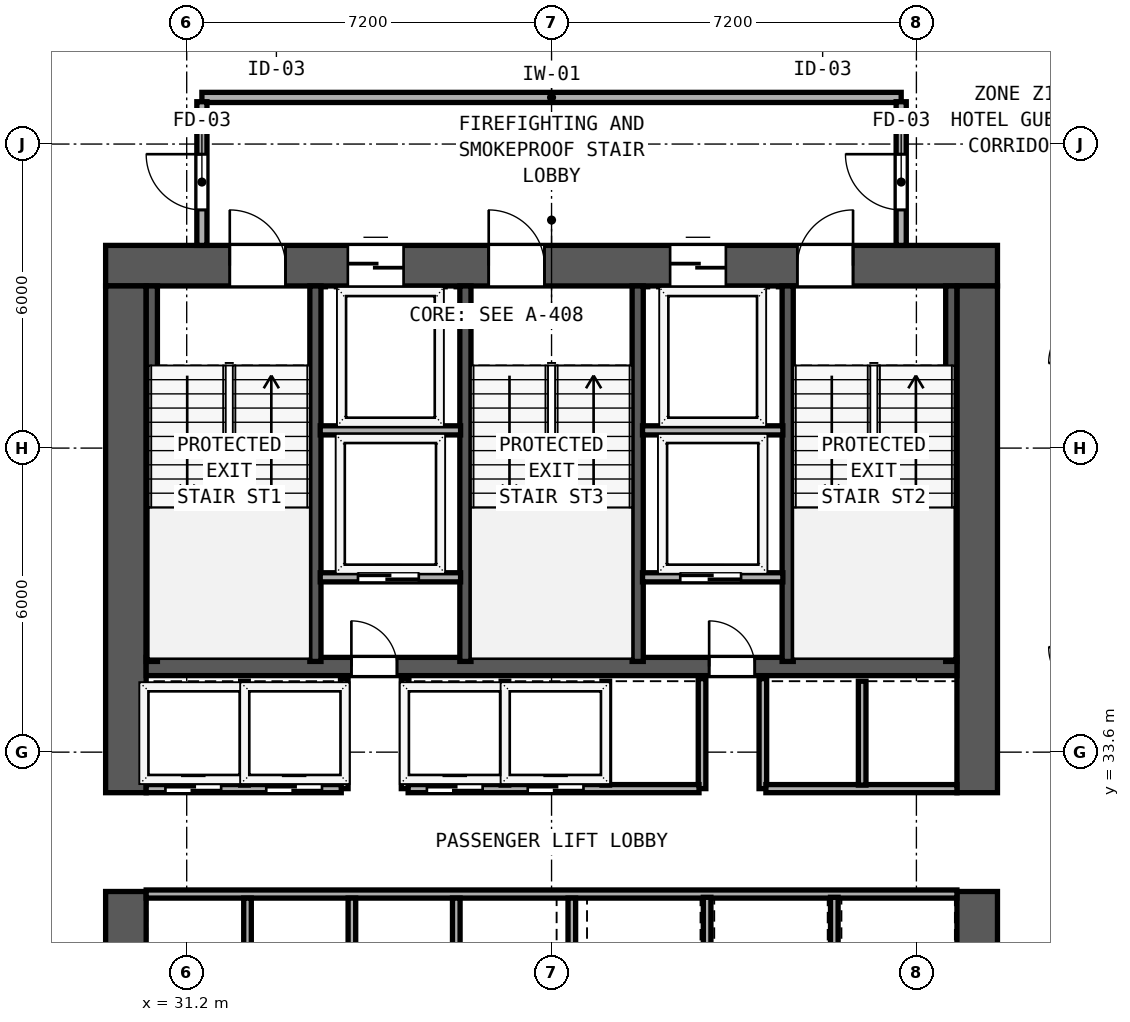
"""IFC4 building model, lengths in metres.
Left out: names, types, materials, properties, quantities, classifications, styles, units other than length and angle.
Written with IfcOpenShell. Run it as: python <this file> out.ifc"""

import sys

from ifc_helpers import new_model, si_unit, direction, frame, frame_2d, origin, place, context, subcontext, project, spatial, rectangle, extrude, element, fill, save


model = new_model("IFC4")
c1 = context("Model", 3, precision=1e-05, world=origin(), true_north=direction((0.0, 1.0)))
c2 = subcontext(c1, "Body", "Model", "MODEL_VIEW")
j1 = project(units=[si_unit("LENGTHUNIT", "METRE"), si_unit("PLANEANGLEUNIT", "RADIAN")], contexts=[c1])
p1 = place(None, origin())
s1 = spatial("IfcSite", under=j1, at=p1, CompositionType="ELEMENT")
p2 = place(p1, origin())
s2 = spatial("IfcBuilding", under=s1, at=p2, CompositionType="ELEMENT")
p3 = place(p2, frame((0.0, 0.0, 35.4)))
s3 = spatial("IfcBuildingStorey", under=s2, at=p3, CompositionType="ELEMENT", Elevation=35.4)
p4 = place(p3, frame((29.6, 43.2, 0.0), z_axis=(0.0, 0.0, 1.0), x_axis=(1.0, 0.0, 0.0)))
e1 = element("IfcWall", 1, at=p4, inside=s3, PredefinedType="SHEAR", context=c2, shape_type="SweptSolid", body=[
    extrude(rectangle(XDim=17.6, YDim=0.8, at=frame_2d((8.8, 0.0))), origin(), (0.0, 0.0, 1.0), 3.6),
])
p5 = place(p4, frame((2.45, 0.0, 0.0)))
e2 = element("IfcOpeningElement", 2, at=p5, cuts=e1, PredefinedType="OPENING", context=c2, shape_type="SweptSolid", body=[
    extrude(rectangle(XDim=1.1, YDim=2.15, at=frame_2d((0.55, 1.075))), frame((0.0, 0.41, 0.0), z_axis=(0.0, -1.0, 0.0), x_axis=(1.0, 0.0, 0.0)), (0.0, 0.0, 1.0), 0.82),
])
p6 = place(p4, frame((7.56, 0.0, 0.0)))
e3 = element("IfcOpeningElement", 3, at=p6, cuts=e1, PredefinedType="OPENING", context=c2, shape_type="SweptSolid", body=[
    extrude(rectangle(XDim=1.1, YDim=2.15, at=frame_2d((0.55, 1.075))), frame((0.0, 0.41, 0.0), z_axis=(0.0, -1.0, 0.0), x_axis=(1.0, 0.0, 0.0)), (0.0, 0.0, 1.0), 0.82),
])
p7 = place(p4, frame((13.65, 0.0, 0.0)))
e4 = element("IfcOpeningElement", 4, at=p7, cuts=e1, PredefinedType="OPENING", context=c2, shape_type="SweptSolid", body=[
    extrude(rectangle(XDim=1.1, YDim=2.15, at=frame_2d((0.55, 1.075))), frame((0.0, 0.41, 0.0), z_axis=(0.0, -1.0, 0.0), x_axis=(1.0, 0.0, 0.0)), (0.0, 0.0, 1.0), 0.82),
])
p8 = place(p4, frame((4.78, 0.0, 0.0)))
e5 = element("IfcOpeningElement", 5, at=p8, cuts=e1, PredefinedType="OPENING", context=c2, shape_type="SweptSolid", body=[
    extrude(rectangle(XDim=1.1, YDim=2.2, at=frame_2d((0.55, 1.1))), frame((0.0, 0.41, 0.0), z_axis=(0.0, -1.0, 0.0), x_axis=(1.0, 0.0, 0.0)), (0.0, 0.0, 1.0), 0.82),
])
p9 = place(p4, frame((11.14, 0.0, 0.0)))
e6 = element("IfcOpeningElement", 6, at=p9, cuts=e1, PredefinedType="OPENING", context=c2, shape_type="SweptSolid", body=[
    extrude(rectangle(XDim=1.1, YDim=2.2, at=frame_2d((0.55, 1.1))), frame((0.0, 0.41, 0.0), z_axis=(0.0, -1.0, 0.0), x_axis=(1.0, 0.0, 0.0)), (0.0, 0.0, 1.0), 0.82),
])
p10 = place(p3, frame((30.0, 26.8, 0.0), z_axis=(0.0, 0.0, 1.0), x_axis=(0.0, 1.0, 0.0)))
e7 = element("IfcWall", 7, at=p10, inside=s3, PredefinedType="SHEAR", context=c2, shape_type="SweptSolid", body=[
    extrude(rectangle(XDim=4.05, YDim=0.8, at=frame_2d((2.025, 0.0))), origin(), (0.0, 0.0, 1.0), 3.6),
])
p11 = place(p3, frame((30.0, 32.8, 0.0), z_axis=(0.0, 0.0, 1.0), x_axis=(0.0, 1.0, 0.0)))
e8 = element("IfcWall", 8, at=p11, inside=s3, PredefinedType="SHEAR", context=c2, shape_type="SweptSolid", body=[
    extrude(rectangle(XDim=10.0, YDim=0.8, at=frame_2d((5.0, 0.0))), origin(), (0.0, 0.0, 1.0), 3.6),
])
p12 = place(p3, frame((46.8, 26.8, 0.0), z_axis=(0.0, 0.0, 1.0), x_axis=(0.0, 1.0, 0.0)))
e9 = element("IfcWall", 9, at=p12, inside=s3, PredefinedType="SHEAR", context=c2, shape_type="SweptSolid", body=[
    extrude(rectangle(XDim=4.05, YDim=0.8, at=frame_2d((2.025, 0.0))), origin(), (0.0, 0.0, 1.0), 3.6),
])
p13 = place(p3, frame((46.8, 32.8, 0.0), z_axis=(0.0, 0.0, 1.0), x_axis=(0.0, 1.0, 0.0)))
e10 = element("IfcWall", 10, at=p13, inside=s3, PredefinedType="SHEAR", context=c2, shape_type="SweptSolid", body=[
    extrude(rectangle(XDim=10.0, YDim=0.8, at=frame_2d((5.0, 0.0))), origin(), (0.0, 0.0, 1.0), 3.6),
])
p14 = place(p3, frame((30.4, 35.29, 0.0), z_axis=(0.0, 0.0, 1.0), x_axis=(1.0, 0.0, 0.0)))
e11 = element("IfcWall", 11, at=p14, inside=s3, PredefinedType="SHEAR", context=c2, shape_type="SweptSolid", body=[
    extrude(rectangle(XDim=16.0, YDim=0.36, at=frame_2d((8.0, 0.0))), origin(), (0.0, 0.0, 1.0), 3.6),
])
p15 = place(p14, frame((4.95, 0.0, 0.0), z_axis=(0.0, 0.0, 1.0), x_axis=(-1.0, 0.0, 0.0)))
e12 = element("IfcOpeningElement", 12, at=p15, cuts=e11, PredefinedType="OPENING", context=c2, shape_type="SweptSolid", body=[
    extrude(rectangle(XDim=0.9, YDim=2.1, at=frame_2d((0.45, 1.05))), frame((0.0, 0.19, 0.0), z_axis=(0.0, -1.0, 0.0), x_axis=(1.0, 0.0, 0.0)), (0.0, 0.0, 1.0), 0.38),
])
p16 = place(p14, frame((12.01, 0.0, 0.0), z_axis=(0.0, 0.0, 1.0), x_axis=(-1.0, 0.0, 0.0)))
e13 = element("IfcOpeningElement", 13, at=p16, cuts=e11, PredefinedType="OPENING", context=c2, shape_type="SweptSolid", body=[
    extrude(rectangle(XDim=0.9, YDim=2.1, at=frame_2d((0.45, 1.05))), frame((0.0, 0.19, 0.0), z_axis=(0.0, -1.0, 0.0), x_axis=(1.0, 0.0, 0.0)), (0.0, 0.0, 1.0), 0.38),
])
for number, where, z_axis, x_axis in (
    (14, (30.512, 35.39, 0.0), (0.0, 0.0, 1.0), (0.0, 1.0, 0.0)),
    (15, (33.74, 35.39, 0.0), (0.0, 0.0, 1.0), (0.0, 1.0, 0.0)),
    (16, (36.7, 35.39, 0.0), (0.0, 0.0, 1.0), (0.0, 1.0, 0.0)),
    (17, (40.1, 35.39, 0.0), (0.0, 0.0, 1.0), (0.0, 1.0, 0.0)),
    (18, (43.06, 35.39, 0.0), (0.0, 0.0, 1.0), (0.0, 1.0, 0.0)),
    (19, (46.288, 35.39, 0.0), (0.0, 0.0, 1.0), (0.0, 1.0, 0.0)),
):
    element("IfcWall", number, at=place(p3, frame(where, z_axis=z_axis, x_axis=x_axis)), inside=s3, PredefinedType="SHEAR", context=c2, shape_type="SweptSolid", body=[
        extrude(rectangle(XDim=7.41, YDim=0.22, at=frame_2d((3.705, 0.0))), origin(), (0.0, 0.0, 1.0), 3.6),
    ])
p17 = place(p3, frame((31.5, 46.52, 0.0), z_axis=(0.0, 0.0, 1.0), x_axis=(1.0, 0.0, 0.0)))
e20 = element("IfcWall", 20, at=p17, inside=s3, PredefinedType="SOLIDWALL", context=c2, shape_type="SweptSolid", body=[
    extrude(rectangle(XDim=13.8, YDim=0.2, at=frame_2d((6.9, 0.0))), origin(), (0.0, 0.0, 1.0), 3.6),
])
p18 = place(p3, frame((31.5, 43.6, 0.0), z_axis=(0.0, 0.0, 1.0), x_axis=(0.0, 1.0, 0.0)))
e21 = element("IfcWall", 21, at=p18, inside=s3, PredefinedType="SOLIDWALL", context=c2, shape_type="SweptSolid", body=[
    extrude(rectangle(XDim=2.835, YDim=0.2, at=frame_2d((1.417, 0.0))), origin(), (0.0, 0.0, 1.0), 3.6),
])
p19 = place(p18, frame((1.8, 0.0, 0.0), z_axis=(0.0, 0.0, 1.0), x_axis=(-1.0, 0.0, 0.0)))
e22 = element("IfcOpeningElement", 22, at=p19, cuts=e21, PredefinedType="OPENING", context=c2, shape_type="SweptSolid", body=[
    extrude(rectangle(XDim=1.1, YDim=2.15, at=frame_2d((0.55, 1.075))), frame((0.0, 0.11, 0.0), z_axis=(0.0, -1.0, 0.0), x_axis=(1.0, 0.0, 0.0)), (0.0, 0.0, 1.0), 0.22),
])
p20 = place(p3, frame((45.3, 43.6, 0.0), z_axis=(0.0, 0.0, 1.0), x_axis=(0.0, 1.0, 0.0)))
e23 = element("IfcWall", 23, at=p20, inside=s3, PredefinedType="SOLIDWALL", context=c2, shape_type="SweptSolid", body=[
    extrude(rectangle(XDim=2.835, YDim=0.2, at=frame_2d((1.417, 0.0))), origin(), (0.0, 0.0, 1.0), 3.6),
])
p21 = place(p20, frame((0.7, 0.0, 0.0)))
e24 = element("IfcOpeningElement", 24, at=p21, cuts=e23, PredefinedType="OPENING", context=c2, shape_type="SweptSolid", body=[
    extrude(rectangle(XDim=1.1, YDim=2.15, at=frame_2d((0.55, 1.075))), frame((0.0, 0.11, 0.0), z_axis=(0.0, -1.0, 0.0), x_axis=(1.0, 0.0, 0.0)), (0.0, 0.0, 1.0), 0.22),
])
for number, where, z_axis, x_axis in (
    (25, (33.835, 39.95, 0.0), (0.0, 0.0, 1.0), (1.0, 0.0, 0.0)),
    (26, (40.195, 39.95, 0.0), (0.0, 0.0, 1.0), (1.0, 0.0, 0.0)),
):
    element("IfcWall", number, at=place(p3, frame(where, z_axis=z_axis, x_axis=x_axis)), inside=s3, PredefinedType="SOLIDWALL", context=c2, shape_type="SweptSolid", body=[
        extrude(rectangle(XDim=2.77, YDim=0.18, at=frame_2d((1.385, 0.0))), origin(), (0.0, 0.0, 1.0), 3.6),
    ])
p22 = place(p3, frame((33.835, 37.05, 0.0), z_axis=(0.0, 0.0, 1.0), x_axis=(1.0, 0.0, 0.0)))
e27 = element("IfcWall", 27, at=p22, inside=s3, PredefinedType="SOLIDWALL", context=c2, shape_type="SweptSolid", body=[
    extrude(rectangle(XDim=2.77, YDim=0.18, at=frame_2d((1.385, 0.0))), origin(), (0.0, 0.0, 1.0), 3.6),
])
p23 = place(p22, frame((1.945, 0.0, 0.0), z_axis=(0.0, 0.0, 1.0), x_axis=(-1.0, 0.0, 0.0)))
e28 = element("IfcOpeningElement", 28, at=p23, cuts=e27, PredefinedType="OPENING", context=c2, shape_type="SweptSolid", body=[
    extrude(rectangle(XDim=1.2, YDim=2.2, at=frame_2d((0.6, 1.1))), frame((0.0, 0.1, 0.0), z_axis=(0.0, -1.0, 0.0), x_axis=(1.0, 0.0, 0.0)), (0.0, 0.0, 1.0), 0.2),
])
for number, where, z_axis, x_axis in (
    (29, (34.31, 32.88, 0.0), (0.0, 0.0, 1.0), (0.0, 1.0, 0.0)),
    (30, (35.51, 32.88, 0.0), (0.0, 0.0, 1.0), (0.0, 1.0, 0.0)),
):
    element("IfcWall", number, at=place(p3, frame(where, z_axis=z_axis, x_axis=x_axis)), inside=s3, PredefinedType="SOLIDWALL", context=c2, shape_type="SweptSolid", body=[
        extrude(rectangle(XDim=2.17, YDim=0.15, at=frame_2d((1.085, 0.0))), origin(), (0.0, 0.0, 1.0), 3.6),
    ])
p24 = place(p3, frame((40.195, 37.05, 0.0), z_axis=(0.0, 0.0, 1.0), x_axis=(1.0, 0.0, 0.0)))
e31 = element("IfcWall", 31, at=p24, inside=s3, PredefinedType="SOLIDWALL", context=c2, shape_type="SweptSolid", body=[
    extrude(rectangle(XDim=2.77, YDim=0.18, at=frame_2d((1.385, 0.0))), origin(), (0.0, 0.0, 1.0), 3.6),
])
p25 = place(p24, frame((1.945, 0.0, 0.0), z_axis=(0.0, 0.0, 1.0), x_axis=(-1.0, 0.0, 0.0)))
e32 = element("IfcOpeningElement", 32, at=p25, cuts=e31, PredefinedType="OPENING", context=c2, shape_type="SweptSolid", body=[
    extrude(rectangle(XDim=1.2, YDim=2.2, at=frame_2d((0.6, 1.1))), frame((0.0, 0.1, 0.0), z_axis=(0.0, -1.0, 0.0), x_axis=(1.0, 0.0, 0.0)), (0.0, 0.0, 1.0), 0.2),
])
for number, where, z_axis, x_axis in (
    (33, (41.37, 32.88, 0.0), (0.0, 0.0, 1.0), (0.0, 1.0, 0.0)),
    (34, (42.57, 32.88, 0.0), (0.0, 0.0, 1.0), (0.0, 1.0, 0.0)),
):
    element("IfcWall", number, at=place(p3, frame(where, z_axis=z_axis, x_axis=x_axis)), inside=s3, PredefinedType="SOLIDWALL", context=c2, shape_type="SweptSolid", body=[
        extrude(rectangle(XDim=2.17, YDim=0.15, at=frame_2d((1.085, 0.0))), origin(), (0.0, 0.0, 1.0), 3.6),
    ])
p26 = place(p3, frame((30.4, 32.88, 0.0), z_axis=(0.0, 0.0, 1.0), x_axis=(1.0, 0.0, 0.0)))
e35 = element("IfcWall", 35, at=p26, inside=s3, PredefinedType="SOLIDWALL", context=c2, shape_type="SweptSolid", body=[
    extrude(rectangle(XDim=3.85, YDim=0.16, at=frame_2d((1.925, 0.0))), origin(), (0.0, 0.0, 1.0), 3.6),
])
p27 = place(p26, frame((1.48, 0.0, 0.0), z_axis=(0.0, 0.0, 1.0), x_axis=(-1.0, 0.0, 0.0)))
e36 = element("IfcOpeningElement", 36, at=p27, cuts=e35, PredefinedType="OPENING", context=c2, shape_type="SweptSolid", body=[
    extrude(rectangle(XDim=1.1, YDim=2.2, at=frame_2d((0.55, 1.1))), frame((0.0, 0.09, 0.0), z_axis=(0.0, -1.0, 0.0), x_axis=(1.0, 0.0, 0.0)), (0.0, 0.0, 1.0), 0.18),
])
p28 = place(p26, frame((3.47, 0.0, 0.0), z_axis=(0.0, 0.0, 1.0), x_axis=(-1.0, 0.0, 0.0)))
e37 = element("IfcOpeningElement", 37, at=p28, cuts=e35, PredefinedType="OPENING", context=c2, shape_type="SweptSolid", body=[
    extrude(rectangle(XDim=1.1, YDim=2.2, at=frame_2d((0.55, 1.1))), frame((0.0, 0.09, 0.0), z_axis=(0.0, -1.0, 0.0), x_axis=(1.0, 0.0, 0.0)), (0.0, 0.0, 1.0), 0.18),
])
p29 = place(p3, frame((35.57, 32.88, 0.0), z_axis=(0.0, 0.0, 1.0), x_axis=(1.0, 0.0, 0.0)))
e38 = element("IfcWall", 38, at=p29, inside=s3, PredefinedType="SOLIDWALL", context=c2, shape_type="SweptSolid", body=[
    extrude(rectangle(XDim=5.74, YDim=0.16, at=frame_2d((2.87, 0.0))), origin(), (0.0, 0.0, 1.0), 3.6),
])
p30 = place(p29, frame((1.47, 0.0, 0.0), z_axis=(0.0, 0.0, 1.0), x_axis=(-1.0, 0.0, 0.0)))
e39 = element("IfcOpeningElement", 39, at=p30, cuts=e38, PredefinedType="OPENING", context=c2, shape_type="SweptSolid", body=[
    extrude(rectangle(XDim=1.1, YDim=2.2, at=frame_2d((0.55, 1.1))), frame((0.0, 0.09, 0.0), z_axis=(0.0, -1.0, 0.0), x_axis=(1.0, 0.0, 0.0)), (0.0, 0.0, 1.0), 0.18),
])
p31 = place(p29, frame((3.46, 0.0, 0.0), z_axis=(0.0, 0.0, 1.0), x_axis=(-1.0, 0.0, 0.0)))
e40 = element("IfcOpeningElement", 40, at=p31, cuts=e38, PredefinedType="OPENING", context=c2, shape_type="SweptSolid", body=[
    extrude(rectangle(XDim=1.1, YDim=2.2, at=frame_2d((0.55, 1.1))), frame((0.0, 0.09, 0.0), z_axis=(0.0, -1.0, 0.0), x_axis=(1.0, 0.0, 0.0)), (0.0, 0.0, 1.0), 0.18),
])
p32 = place(p3, frame((42.63, 32.88, 0.0), z_axis=(0.0, 0.0, 1.0), x_axis=(1.0, 0.0, 0.0)))
e41 = element("IfcWall", 41, at=p32, inside=s3, PredefinedType="SOLIDWALL", context=c2, shape_type="SweptSolid", body=[
    extrude(rectangle(XDim=3.77, YDim=0.16, at=frame_2d((1.885, 0.0))), origin(), (0.0, 0.0, 1.0), 3.6),
])
for number, where, z_axis, x_axis in (
    (42, (32.34, 32.95, 0.0), (0.0, 0.0, 1.0), (0.0, 1.0, 0.0)),
    (43, (37.48, 32.95, 0.0), (0.0, 0.0, 1.0), (0.0, 1.0, 0.0)),
    (44, (39.47, 32.95, 0.0), (0.0, 0.0, 1.0), (0.0, 1.0, 0.0)),
    (45, (44.53, 32.95, 0.0), (0.0, 0.0, 1.0), (0.0, 1.0, 0.0)),
):
    element("IfcWall", number, at=place(p3, frame(where, z_axis=z_axis, x_axis=x_axis)), inside=s3, PredefinedType="SOLIDWALL", context=c2, shape_type="SweptSolid", body=[
        extrude(rectangle(XDim=2.05, YDim=0.15, at=frame_2d((1.025, 0.0))), origin(), (0.0, 0.0, 1.0), 3.6),
    ])
p33 = place(p3, frame((30.4, 30.8, 0.0), z_axis=(0.0, 0.0, 1.0), x_axis=(1.0, 0.0, 0.0)))
e46 = element("IfcWall", 46, at=p33, inside=s3, PredefinedType="SOLIDWALL", context=c2, shape_type="SweptSolid", body=[
    extrude(rectangle(XDim=16.0, YDim=0.16, at=frame_2d((8.0, 0.0))), origin(), (0.0, 0.0, 1.0), 3.6),
])
for number, where, z_axis, x_axis in (
    (47, (32.4, 28.735, 0.0), (0.0, 0.0, 1.0), (0.0, 1.0, 0.0)),
    (48, (34.46, 28.735, 0.0), (0.0, 0.0, 1.0), (0.0, 1.0, 0.0)),
    (49, (36.52, 28.735, 0.0), (0.0, 0.0, 1.0), (0.0, 1.0, 0.0)),
    (50, (38.8, 28.735, 0.0), (0.0, 0.0, 1.0), (0.0, 1.0, 0.0)),
):
    element("IfcWall", number, at=place(p3, frame(where, z_axis=z_axis, x_axis=x_axis)), inside=s3, PredefinedType="SOLIDWALL", context=c2, shape_type="SweptSolid", body=[
        extrude(rectangle(XDim=1.985, YDim=0.15, at=frame_2d((0.992, 0.0))), origin(), (0.0, 0.0, 1.0), 3.6),
    ])
for number, where, z_axis, x_axis in (
    (51, (41.47, 28.75, 0.0), (0.0, 0.0, 1.0), (0.0, 1.0, 0.0)),
    (52, (43.98, 28.75, 0.0), (0.0, 0.0, 1.0), (0.0, 1.0, 0.0)),
):
    element("IfcWall", number, at=place(p3, frame(where, z_axis=z_axis, x_axis=x_axis)), inside=s3, PredefinedType="SOLIDWALL", context=c2, shape_type="SweptSolid", body=[
        extrude(rectangle(XDim=1.985, YDim=0.15, at=frame_2d((0.993, 0.0))), origin(), (0.0, 0.0, 1.0), 3.6),
    ])
p34 = place(p5, origin())
e53 = element("IfcDoor", 53, at=p34, inside=s3, OperationType="SINGLE_SWING_LEFT", PredefinedType="DOOR", context=c2, shape_type="SweptSolid", body=[
    extrude(rectangle(XDim=1.1, YDim=2.15, at=frame_2d((0.55, 1.075))), frame((0.0, 0.185, 0.0), z_axis=(0.0, -1.0, 0.0), x_axis=(1.0, 0.0, 0.0)), (0.0, 0.0, 1.0), 0.05),
])
fill(e2, e53)
p35 = place(p6, origin())
e54 = element("IfcDoor", 54, at=p35, inside=s3, OperationType="SINGLE_SWING_LEFT", PredefinedType="DOOR", context=c2, shape_type="SweptSolid", body=[
    extrude(rectangle(XDim=1.1, YDim=2.15, at=frame_2d((0.55, 1.075))), frame((0.0, 0.185, 0.0), z_axis=(0.0, -1.0, 0.0), x_axis=(1.0, 0.0, 0.0)), (0.0, 0.0, 1.0), 0.05),
])
fill(e3, e54)
p36 = place(p7, origin())
e55 = element("IfcDoor", 55, at=p36, inside=s3, OperationType="SINGLE_SWING_RIGHT", PredefinedType="DOOR", context=c2, shape_type="SweptSolid", body=[
    extrude(rectangle(XDim=1.1, YDim=2.15, at=frame_2d((0.55, 1.075))), frame((0.0, 0.185, 0.0), z_axis=(0.0, -1.0, 0.0), x_axis=(1.0, 0.0, 0.0)), (0.0, 0.0, 1.0), 0.05),
])
fill(e4, e55)
p37 = place(p19, origin())
e56 = element("IfcDoor", 56, at=p37, inside=s3, OperationType="SINGLE_SWING_LEFT", PredefinedType="DOOR", context=c2, shape_type="SweptSolid", body=[
    extrude(rectangle(XDim=1.1, YDim=2.15, at=frame_2d((0.55, 1.075))), frame((0.0, 0.025, 0.0), z_axis=(0.0, -1.0, 0.0), x_axis=(1.0, 0.0, 0.0)), (0.0, 0.0, 1.0), 0.05),
])
fill(e22, e56)
p38 = place(p21, origin())
e57 = element("IfcDoor", 57, at=p38, inside=s3, OperationType="SINGLE_SWING_RIGHT", PredefinedType="DOOR", context=c2, shape_type="SweptSolid", body=[
    extrude(rectangle(XDim=1.1, YDim=2.15, at=frame_2d((0.55, 1.075))), frame((0.0, 0.025, 0.0), z_axis=(0.0, -1.0, 0.0), x_axis=(1.0, 0.0, 0.0)), (0.0, 0.0, 1.0), 0.05),
])
fill(e24, e57)
p39 = place(p8, origin())
e58 = element("IfcDoor", 58, at=p39, inside=s3, OperationType="SLIDING_TO_LEFT", PredefinedType="DOOR", context=c2, shape_type="SweptSolid", body=[
    extrude(rectangle(XDim=1.1, YDim=2.2, at=frame_2d((0.55, 1.1))), frame((0.0, 0.185, 0.0), z_axis=(0.0, -1.0, 0.0), x_axis=(1.0, 0.0, 0.0)), (0.0, 0.0, 1.0), 0.05),
])
fill(e5, e58)
p40 = place(p9, origin())
e59 = element("IfcDoor", 59, at=p40, inside=s3, OperationType="SLIDING_TO_LEFT", PredefinedType="DOOR", context=c2, shape_type="SweptSolid", body=[
    extrude(rectangle(XDim=1.1, YDim=2.2, at=frame_2d((0.55, 1.1))), frame((0.0, 0.185, 0.0), z_axis=(0.0, -1.0, 0.0), x_axis=(1.0, 0.0, 0.0)), (0.0, 0.0, 1.0), 0.05),
])
fill(e6, e59)
p41 = place(p23, origin())
e60 = element("IfcDoor", 60, at=p41, inside=s3, OperationType="SLIDING_TO_RIGHT", PredefinedType="DOOR", context=c2, shape_type="SweptSolid", body=[
    extrude(rectangle(XDim=1.2, YDim=2.2, at=frame_2d((0.6, 1.1))), frame((0.0, 0.025, 0.0), z_axis=(0.0, -1.0, 0.0), x_axis=(1.0, 0.0, 0.0)), (0.0, 0.0, 1.0), 0.05),
])
fill(e28, e60)
p42 = place(p15, origin())
e61 = element("IfcDoor", 61, at=p42, inside=s3, OperationType="SINGLE_SWING_RIGHT", PredefinedType="DOOR", context=c2, shape_type="SweptSolid", body=[
    extrude(rectangle(XDim=0.9, YDim=2.1, at=frame_2d((0.45, 1.05))), frame((0.0, 0.025, 0.0), z_axis=(0.0, -1.0, 0.0), x_axis=(1.0, 0.0, 0.0)), (0.0, 0.0, 1.0), 0.05),
])
fill(e12, e61)
p43 = place(p25, origin())
e62 = element("IfcDoor", 62, at=p43, inside=s3, OperationType="SLIDING_TO_RIGHT", PredefinedType="DOOR", context=c2, shape_type="SweptSolid", body=[
    extrude(rectangle(XDim=1.2, YDim=2.2, at=frame_2d((0.6, 1.1))), frame((0.0, 0.025, 0.0), z_axis=(0.0, -1.0, 0.0), x_axis=(1.0, 0.0, 0.0)), (0.0, 0.0, 1.0), 0.05),
])
fill(e32, e62)
p44 = place(p16, origin())
e63 = element("IfcDoor", 63, at=p44, inside=s3, OperationType="SINGLE_SWING_RIGHT", PredefinedType="DOOR", context=c2, shape_type="SweptSolid", body=[
    extrude(rectangle(XDim=0.9, YDim=2.1, at=frame_2d((0.45, 1.05))), frame((0.0, 0.025, 0.0), z_axis=(0.0, -1.0, 0.0), x_axis=(1.0, 0.0, 0.0)), (0.0, 0.0, 1.0), 0.05),
])
fill(e13, e63)
p45 = place(p27, origin())
e64 = element("IfcDoor", 64, at=p45, inside=s3, OperationType="SLIDING_TO_LEFT", PredefinedType="DOOR", context=c2, shape_type="SweptSolid", body=[
    extrude(rectangle(XDim=1.1, YDim=2.2, at=frame_2d((0.55, 1.1))), frame((0.0, 0.025, 0.0), z_axis=(0.0, -1.0, 0.0), x_axis=(1.0, 0.0, 0.0)), (0.0, 0.0, 1.0), 0.05),
])
fill(e36, e64)
p46 = place(p28, origin())
e65 = element("IfcDoor", 65, at=p46, inside=s3, OperationType="SLIDING_TO_LEFT", PredefinedType="DOOR", context=c2, shape_type="SweptSolid", body=[
    extrude(rectangle(XDim=1.1, YDim=2.2, at=frame_2d((0.55, 1.1))), frame((0.0, 0.025, 0.0), z_axis=(0.0, -1.0, 0.0), x_axis=(1.0, 0.0, 0.0)), (0.0, 0.0, 1.0), 0.05),
])
fill(e37, e65)
p47 = place(p30, origin())
e66 = element("IfcDoor", 66, at=p47, inside=s3, OperationType="SLIDING_TO_LEFT", PredefinedType="DOOR", context=c2, shape_type="SweptSolid", body=[
    extrude(rectangle(XDim=1.1, YDim=2.2, at=frame_2d((0.55, 1.1))), frame((0.0, 0.025, 0.0), z_axis=(0.0, -1.0, 0.0), x_axis=(1.0, 0.0, 0.0)), (0.0, 0.0, 1.0), 0.05),
])
fill(e39, e66)
p48 = place(p31, origin())
e67 = element("IfcDoor", 67, at=p48, inside=s3, OperationType="SLIDING_TO_LEFT", PredefinedType="DOOR", context=c2, shape_type="SweptSolid", body=[
    extrude(rectangle(XDim=1.1, YDim=2.2, at=frame_2d((0.55, 1.1))), frame((0.0, 0.025, 0.0), z_axis=(0.0, -1.0, 0.0), x_axis=(1.0, 0.0, 0.0)), (0.0, 0.0, 1.0), 0.05),
])
fill(e40, e67)
save(model, sys.argv[1])
